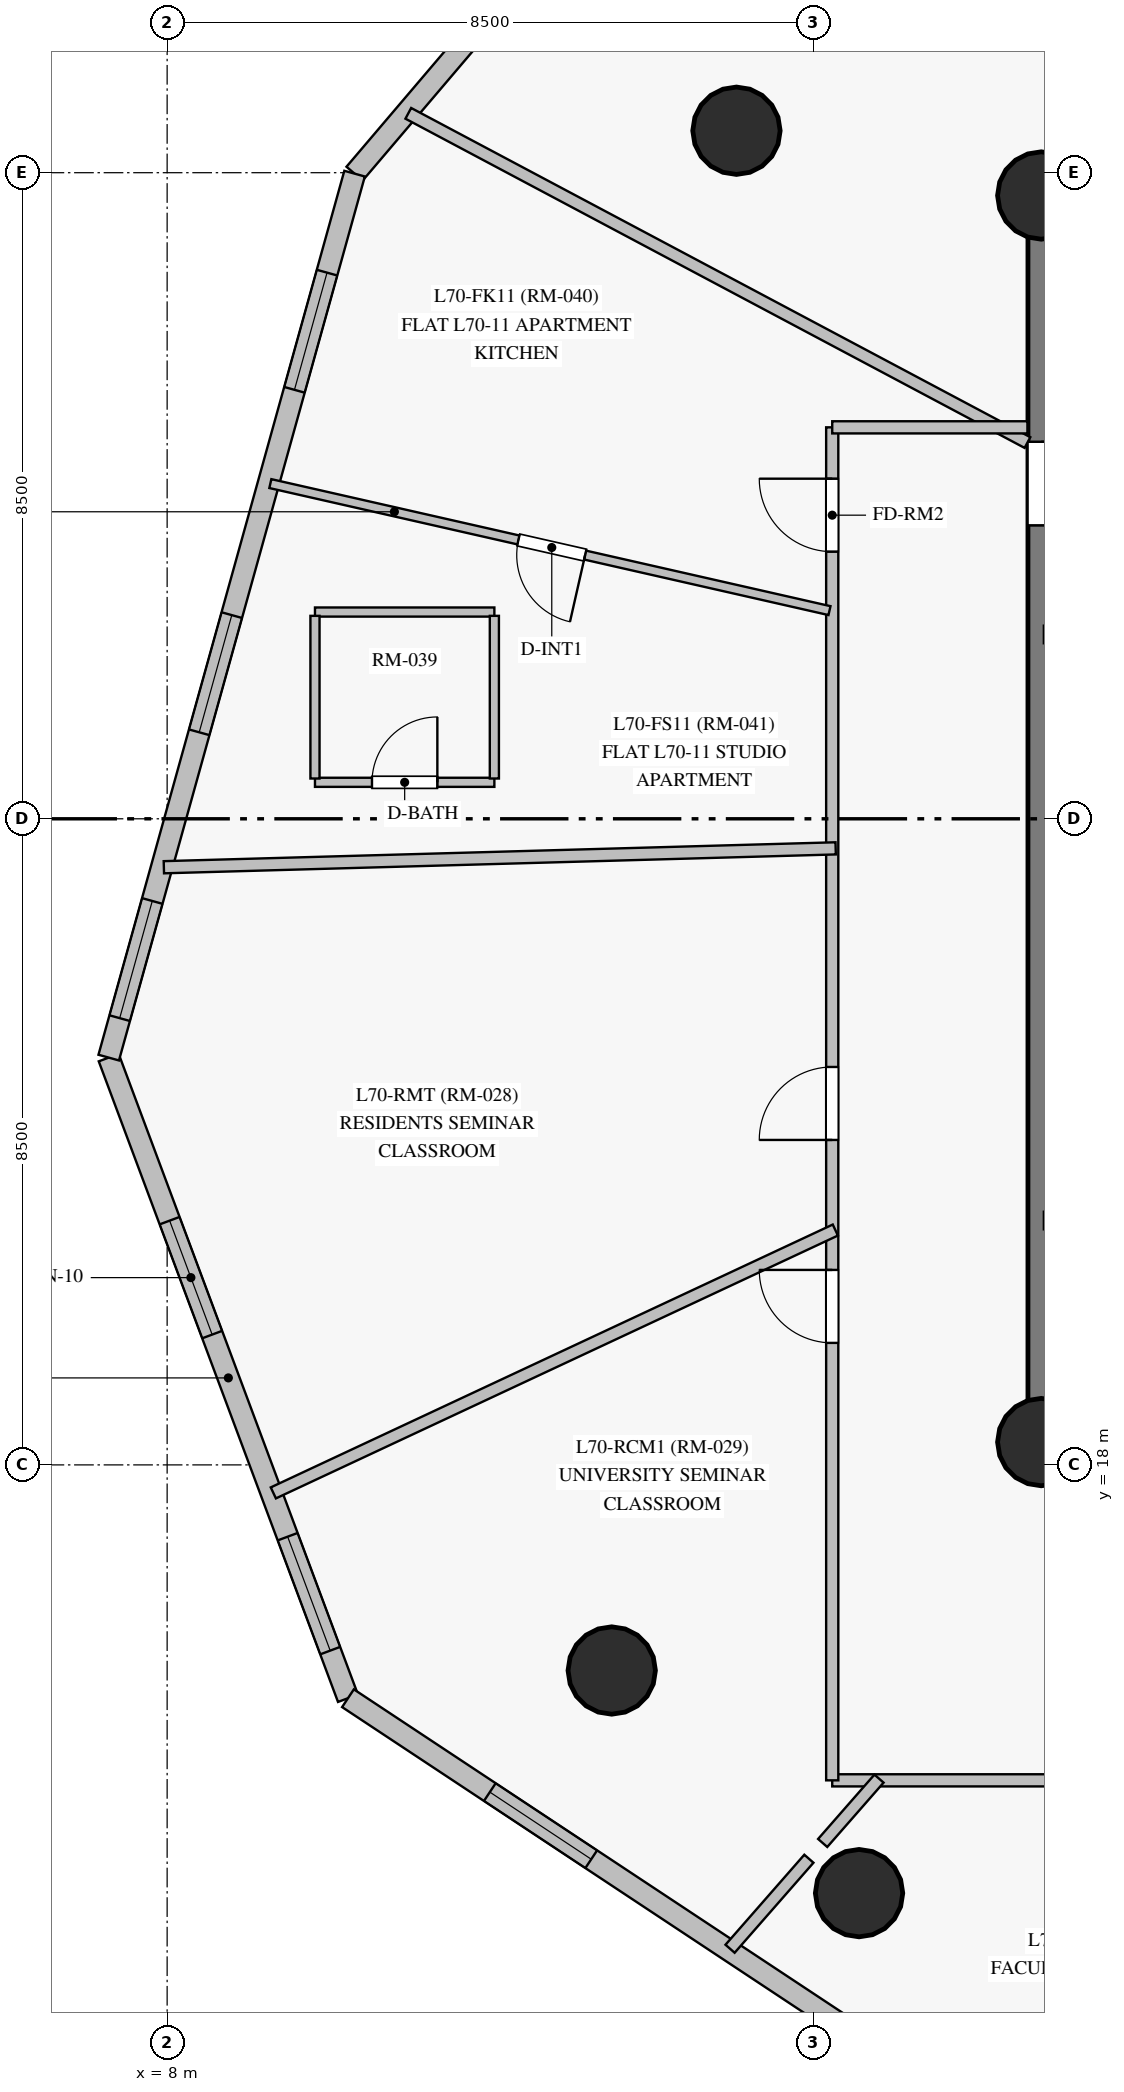
"""IFC4 building model, lengths in metres.
Left out: names, types, materials, properties, quantities, classifications, styles, units other than length and angle.
Written with IfcOpenShell. Run it as: python <this file> out.ifc"""

import sys

from ifc_helpers import new_model, si_unit, direction, frame, frame_2d, origin, origin_with_axes, origin_2d, place, context, subcontext, project, spatial, rectangle, circle, extrude, source, transform, mapped, element, fill, save


model = new_model("IFC4")
c1 = context("Model", 3, precision=1e-05, world=origin(), true_north=direction((0.0, 1.0)))
c2 = subcontext(c1, "Body", "Model", "MODEL_VIEW")
j1 = project(units=[si_unit("LENGTHUNIT", "METRE"), si_unit("PLANEANGLEUNIT", "RADIAN")], contexts=[c1])
p1 = place(None, origin())
s1 = spatial("IfcSite", under=j1, at=p1, CompositionType="ELEMENT")
p2 = place(p1, origin())
s2 = spatial("IfcBuilding", under=s1, at=p2, CompositionType="ELEMENT")
p3 = place(p2, frame((0.0, 0.0, 238.25)))
s3 = spatial("IfcBuildingStorey", under=s2, at=p3, CompositionType="ELEMENT", Elevation=238.25)
p4 = place(p3, frame((19.5, 18.3, 0.0), z_axis=(0.0, 0.0, 1.0), x_axis=(1.0, 0.0, 0.0)))
e1 = element("IfcWall", 1, at=p4, inside=s3, PredefinedType="SHEAR", context=c2, shape_type="SweptSolid", body=[
    extrude(rectangle(XDim=7.05, YDim=0.35, at=frame_2d((3.525, 0.0))), origin(), (0.0, 0.0, 1.0), 2.85),
])
p5 = place(p4, frame((4.2, 0.0, 0.0)))
e2 = element("IfcOpeningElement", 2, at=p5, cuts=e1, PredefinedType="OPENING", context=c2, shape_type="SweptSolid", body=[
    extrude(rectangle(XDim=1.4, YDim=2.2, at=frame_2d((0.7, 1.1))), frame((0.0, 0.185, 0.0), z_axis=(0.0, -1.0, 0.0), x_axis=(1.0, 0.0, 0.0)), (0.0, 0.0, 1.0), 0.37),
])
p6 = place(p3, frame((26.55, 34.7, 0.0), z_axis=(0.0, 0.0, 1.0), x_axis=(-1.0, 0.0, 0.0)))
e3 = element("IfcWall", 3, at=p6, inside=s3, PredefinedType="SHEAR", context=c2, shape_type="SweptSolid", body=[
    extrude(rectangle(XDim=7.05, YDim=0.35, at=frame_2d((3.525, 0.0))), origin(), (0.0, 0.0, 1.0), 2.85),
])
p7 = place(p3, frame((19.5, 34.7, 0.0), z_axis=(0.0, 0.0, 1.0), x_axis=(0.0, -1.0, 0.0)))
e4 = element("IfcWall", 4, at=p7, inside=s3, PredefinedType="SHEAR", context=c2, shape_type="SweptSolid", body=[
    extrude(rectangle(XDim=16.4, YDim=0.35, at=frame_2d((8.2, 0.0))), origin(), (0.0, 0.0, 1.0), 2.85),
])
p8 = place(p7, frame((3.24, 0.0, 0.0)))
e5 = element("IfcOpeningElement", 5, at=p8, cuts=e4, PredefinedType="OPENING", context=c2, shape_type="SweptSolid", body=[
    extrude(rectangle(XDim=1.1, YDim=2.15, at=frame_2d((0.55, 1.075))), frame((0.0, 0.185, 0.0), z_axis=(0.0, -1.0, 0.0), x_axis=(1.0, 0.0, 0.0)), (0.0, 0.0, 1.0), 0.37),
])
m1 = source(origin_with_axes(), c2, "Body", "SweptSolid", [
    extrude(circle(Radius=0.575, at=origin_2d()), origin(), (0.0, 0.0, 1.0), 3.05),
])
for number, where, z_axis, x_axis in (
    (6, (19.5, 18.3, 0.0), (0.0, 0.0, 1.0), (1.0, 0.0, 0.0)),
    (7, (19.5, 34.7, 0.0), (0.0, 0.0, 1.0), (1.0, 0.0, 0.0)),
    (8, (15.49, 35.552, 0.0), (0.0, 0.0, 1.0), (1.0, 0.0, 0.0)),
    (9, (13.849, 15.295, 0.0), (0.0, 0.0, 1.0), (1.0, 0.0, 0.0)),
    (10, (17.103, 12.366, 0.0), (0.0, 0.0, 1.0), (1.0, 0.0, 0.0)),
):
    element("IfcColumn", number, at=place(p3, frame(where, z_axis=z_axis, x_axis=x_axis)), inside=s3, PredefinedType="COLUMN", context=c2, shape_type="MappedRepresentation", body=[
        mapped(m1, transform((0.0, 0.0, 0.0), scale=1.0)),
    ])
p9 = place(p3, frame((7.231, 23.358, 0.0), z_axis=(0.0, 0.0, 1.0), x_axis=(0.349885954816, -0.93679230282, 0.0)))
e11 = element("IfcWall", 11, at=p9, inside=s3, PredefinedType="SOLIDWALL", context=c2, shape_type="SweptSolid", body=[
    extrude(rectangle(XDim=8.996, YDim=0.28, at=frame_2d((4.498, 0.0))), origin(), (0.0, 0.0, 1.0), 2.85),
])
p10 = place(p9, frame((2.29, 0.0, 0.85)))
e12 = element("IfcOpeningElement", 12, at=p10, cuts=e11, PredefinedType="OPENING", context=c2, shape_type="SweptSolid", body=[
    extrude(rectangle(XDim=1.6, YDim=1.6, at=frame_2d((0.8, 0.8))), frame((0.0, 0.15, 0.0), z_axis=(0.0, -1.0, 0.0), x_axis=(1.0, 0.0, 0.0)), (0.0, 0.0, 1.0), 0.3),
])
p11 = place(p9, frame((6.728, 0.0, 0.85)))
e13 = element("IfcOpeningElement", 13, at=p11, cuts=e11, PredefinedType="OPENING", context=c2, shape_type="SweptSolid", body=[
    extrude(rectangle(XDim=1.6, YDim=1.6, at=frame_2d((0.8, 0.8))), frame((0.0, 0.15, 0.0), z_axis=(0.0, -1.0, 0.0), x_axis=(1.0, 0.0, 0.0)), (0.0, 0.0, 1.0), 0.3),
])
p12 = place(p3, frame((10.379, 14.93, 0.0), z_axis=(0.0, 0.0, 1.0), x_axis=(0.83391564232, -0.551891929179, 0.0)))
e14 = element("IfcWall", 14, at=p12, inside=s3, PredefinedType="SOLIDWALL", context=c2, shape_type="SweptSolid", body=[
    extrude(rectangle(XDim=12.071, YDim=0.28, at=frame_2d((6.036, 0.0))), origin(), (0.0, 0.0, 1.0), 2.85),
])
p13 = place(p12, frame((2.238, 0.0, 0.85)))
e15 = element("IfcOpeningElement", 15, at=p13, cuts=e14, PredefinedType="OPENING", context=c2, shape_type="SweptSolid", body=[
    extrude(rectangle(XDim=1.6, YDim=1.6, at=frame_2d((0.8, 0.8))), frame((0.0, 0.15, 0.0), z_axis=(0.0, -1.0, 0.0), x_axis=(1.0, 0.0, 0.0)), (0.0, 0.0, 1.0), 0.3),
])
p14 = place(p12, frame((8.213, 0.0, 0.85)))
e16 = element("IfcOpeningElement", 16, at=p14, cuts=e14, PredefinedType="OPENING", context=c2, shape_type="SweptSolid", body=[
    extrude(rectangle(XDim=1.6, YDim=1.6, at=frame_2d((0.8, 0.8))), frame((0.0, 0.15, 0.0), z_axis=(0.0, -1.0, 0.0), x_axis=(1.0, 0.0, 0.0)), (0.0, 0.0, 1.0), 0.3),
])
p15 = place(p3, frame((16.468, 42.041, 0.0), z_axis=(0.0, 0.0, 1.0), x_axis=(-0.648012583003, -0.761629629327, 0.0)))
e17 = element("IfcWall", 17, at=p15, inside=s3, PredefinedType="SOLIDWALL", context=c2, shape_type="SweptSolid", body=[
    extrude(rectangle(XDim=9.261, YDim=0.28, at=frame_2d((4.631, 0.0))), origin(), (0.0, 0.0, 1.0), 2.85),
])
p16 = place(p15, frame((1.453, 0.0, 0.85)))
e18 = element("IfcOpeningElement", 18, at=p16, cuts=e17, PredefinedType="OPENING", context=c2, shape_type="SweptSolid", body=[
    extrude(rectangle(XDim=1.6, YDim=1.6, at=frame_2d((0.8, 0.8))), frame((0.0, 0.15, 0.0), z_axis=(0.0, -1.0, 0.0), x_axis=(1.0, 0.0, 0.0)), (0.0, 0.0, 1.0), 0.3),
])
p17 = place(p15, frame((5.198, 0.0, 0.85)))
e19 = element("IfcOpeningElement", 19, at=p17, cuts=e17, PredefinedType="OPENING", context=c2, shape_type="SweptSolid", body=[
    extrude(rectangle(XDim=1.6, YDim=1.6, at=frame_2d((0.8, 0.8))), frame((0.0, 0.15, 0.0), z_axis=(0.0, -1.0, 0.0), x_axis=(1.0, 0.0, 0.0)), (0.0, 0.0, 1.0), 0.3),
])
p18 = place(p3, frame((10.466, 34.988, 0.0), z_axis=(0.0, 0.0, 1.0), x_axis=(-0.267969313024, -0.963427447853, 0.0)))
e20 = element("IfcWall", 20, at=p18, inside=s3, PredefinedType="SOLIDWALL", context=c2, shape_type="SweptSolid", body=[
    extrude(rectangle(XDim=12.071, YDim=0.28, at=frame_2d((6.035, 0.0))), origin(), (0.0, 0.0, 1.0), 2.85),
])
p19 = place(p18, frame((1.352, 0.0, 0.85)))
e21 = element("IfcOpeningElement", 21, at=p19, cuts=e20, PredefinedType="OPENING", context=c2, shape_type="SweptSolid", body=[
    extrude(rectangle(XDim=1.6, YDim=1.6, at=frame_2d((0.8, 0.8))), frame((0.0, 0.15, 0.0), z_axis=(0.0, -1.0, 0.0), x_axis=(1.0, 0.0, 0.0)), (0.0, 0.0, 1.0), 0.3),
])
p20 = place(p18, frame((6.029, 0.0, 0.85)))
e22 = element("IfcOpeningElement", 22, at=p20, cuts=e20, PredefinedType="OPENING", context=c2, shape_type="SweptSolid", body=[
    extrude(rectangle(XDim=1.6, YDim=1.6, at=frame_2d((0.8, 0.8))), frame((0.0, 0.15, 0.0), z_axis=(0.0, -1.0, 0.0), x_axis=(1.0, 0.0, 0.0)), (0.0, 0.0, 1.0), 0.3),
])
p21 = place(p18, frame((9.932, 0.0, 0.85)))
e23 = element("IfcOpeningElement", 23, at=p21, cuts=e20, PredefinedType="OPENING", context=c2, shape_type="SweptSolid", body=[
    extrude(rectangle(XDim=1.6, YDim=1.6, at=frame_2d((0.8, 0.8))), frame((0.0, 0.15, 0.0), z_axis=(0.0, -1.0, 0.0), x_axis=(1.0, 0.0, 0.0)), (0.0, 0.0, 1.0), 0.3),
])
p22 = place(p3, frame((41.8, 13.85, 0.0), z_axis=(0.0, 0.0, 1.0), x_axis=(-1.0, 0.0, 0.0)))
e24 = element("IfcWall", 24, at=p22, inside=s3, PredefinedType="PARTITIONING", context=c2, shape_type="SweptSolid", body=[
    extrude(rectangle(XDim=25.05, YDim=0.16, at=frame_2d((12.525, 0.0))), origin(), (0.0, 0.0, 1.0), 2.3),
])
p23 = place(p22, frame((18.312, 0.0, 0.0)))
e25 = element("IfcOpeningElement", 25, at=p23, cuts=e24, PredefinedType="OPENING", context=c2, shape_type="SweptSolid", body=[
    extrude(rectangle(XDim=0.96, YDim=2.15, at=frame_2d((0.48, 1.075))), frame((0.0, 0.09, 0.0), z_axis=(0.0, -1.0, 0.0), x_axis=(1.0, 0.0, 0.0)), (0.0, 0.0, 1.0), 0.18),
])
p24 = place(p22, frame((12.05, 0.0, 0.0)))
e26 = element("IfcOpeningElement", 26, at=p24, cuts=e24, PredefinedType="OPENING", context=c2, shape_type="SweptSolid", body=[
    extrude(rectangle(XDim=0.96, YDim=2.15, at=frame_2d((0.48, 1.075))), frame((0.0, 0.09, 0.0), z_axis=(0.0, -1.0, 0.0), x_axis=(1.0, 0.0, 0.0)), (0.0, 0.0, 1.0), 0.18),
])
p25 = place(p22, frame((8.292, 0.0, 0.0)))
e27 = element("IfcOpeningElement", 27, at=p25, cuts=e24, PredefinedType="OPENING", context=c2, shape_type="SweptSolid", body=[
    extrude(rectangle(XDim=0.96, YDim=2.15, at=frame_2d((0.48, 1.075))), frame((0.0, 0.09, 0.0), z_axis=(0.0, -1.0, 0.0), x_axis=(1.0, 0.0, 0.0)), (0.0, 0.0, 1.0), 0.18),
])
p26 = place(p3, frame((16.75, 13.85, 0.0), z_axis=(0.0, 0.0, 1.0), x_axis=(0.0, 1.0, 0.0)))
e28 = element("IfcWall", 28, at=p26, inside=s3, PredefinedType="PARTITIONING", context=c2, shape_type="SweptSolid", body=[
    extrude(rectangle(XDim=17.8, YDim=0.16, at=frame_2d((8.9, 0.0))), origin(), (0.0, 0.0, 1.0), 2.45),
])
p27 = place(p26, frame((16.164, 0.0, 0.0)))
e29 = element("IfcOpeningElement", 29, at=p27, cuts=e28, PredefinedType="OPENING", context=c2, shape_type="SweptSolid", body=[
    extrude(rectangle(XDim=0.96, YDim=2.15, at=frame_2d((0.48, 1.075))), frame((0.0, 0.09, 0.0), z_axis=(0.0, -1.0, 0.0), x_axis=(1.0, 0.0, 0.0)), (0.0, 0.0, 1.0), 0.18),
])
p28 = place(p26, frame((8.425, 0.0, 0.0)))
e30 = element("IfcOpeningElement", 30, at=p28, cuts=e28, PredefinedType="OPENING", context=c2, shape_type="SweptSolid", body=[
    extrude(rectangle(XDim=0.96, YDim=2.15, at=frame_2d((0.48, 1.075))), frame((0.0, 0.09, 0.0), z_axis=(0.0, -1.0, 0.0), x_axis=(1.0, 0.0, 0.0)), (0.0, 0.0, 1.0), 0.18),
])
p29 = place(p26, frame((5.755, 0.0, 0.0)))
e31 = element("IfcOpeningElement", 31, at=p29, cuts=e28, PredefinedType="OPENING", context=c2, shape_type="SweptSolid", body=[
    extrude(rectangle(XDim=0.96, YDim=2.15, at=frame_2d((0.48, 1.075))), frame((0.0, 0.09, 0.0), z_axis=(0.0, -1.0, 0.0), x_axis=(1.0, 0.0, 0.0)), (0.0, 0.0, 1.0), 0.18),
])
p30 = place(p3, frame((19.319, 31.45, 0.0), z_axis=(0.0, 0.0, 1.0), x_axis=(-0.882947778203, 0.469471214203, 0.0)))
e32 = element("IfcWall", 32, at=p30, inside=s3, PredefinedType="PARTITIONING", context=c2, shape_type="SweptSolid", body=[
    extrude(rectangle(XDim=9.226, YDim=0.16, at=frame_2d((4.613, 0.0))), origin(), (0.0, 0.0, 1.0), 2.85),
])
p31 = place(p3, frame((7.957, 25.863, 0.0), z_axis=(0.0, 0.0, 1.0), x_axis=(0.999605642757, 0.028081292157, 0.0)))
e33 = element("IfcWall", 33, at=p31, inside=s3, PredefinedType="PARTITIONING", context=c2, shape_type="SweptSolid", body=[
    extrude(rectangle(XDim=8.842, YDim=0.16, at=frame_2d((4.421, 0.0))), origin(), (0.0, 0.0, 1.0), 2.85),
])
p32 = place(p3, frame((16.791, 21.09, 0.0), z_axis=(0.0, 0.0, 1.0), x_axis=(-0.905822132806, -0.423658192084, 0.0)))
e34 = element("IfcWall", 34, at=p32, inside=s3, PredefinedType="PARTITIONING", context=c2, shape_type="SweptSolid", body=[
    extrude(rectangle(XDim=8.162, YDim=0.16, at=frame_2d((4.081, 0.0))), origin(), (0.0, 0.0, 1.0), 2.85),
])
p33 = place(p3, frame((16.714, 29.239, 0.0), z_axis=(0.0, 0.0, 1.0), x_axis=(-0.975158919123, 0.22150639371, 0.0)))
e35 = element("IfcWall", 35, at=p33, inside=s3, PredefinedType="PARTITIONING", context=c2, shape_type="SweptSolid", body=[
    extrude(rectangle(XDim=7.543, YDim=0.12, at=frame_2d((3.772, 0.0))), origin(), (0.0, 0.0, 1.0), 2.85),
])
p34 = place(p33, frame((3.297, 0.0, 0.0)))
e36 = element("IfcOpeningElement", 36, at=p34, cuts=e35, PredefinedType="OPENING", context=c2, shape_type="SweptSolid", body=[
    extrude(rectangle(XDim=0.9, YDim=2.1, at=frame_2d((0.45, 1.05))), frame((0.0, 0.07, 0.0), z_axis=(0.0, -1.0, 0.0), x_axis=(1.0, 0.0, 0.0)), (0.0, 0.0, 1.0), 0.14),
])
p35 = place(p3, frame((16.75, 31.65, 0.0), z_axis=(0.0, 0.0, 1.0), x_axis=(1.0, 0.0, 0.0)))
e37 = element("IfcWall", 37, at=p35, inside=s3, PredefinedType="PARTITIONING", context=c2, shape_type="SweptSolid", body=[
    extrude(rectangle(XDim=2.568, YDim=0.16, at=frame_2d((1.284, 0.0))), origin(), (0.0, 0.0, 1.0), 2.85),
])
p36 = place(p3, frame((9.945, 26.98, 0.0), z_axis=(0.0, 0.0, 1.0), x_axis=(1.0, 0.0, 0.0)))
e38 = element("IfcWall", 38, at=p36, inside=s3, PredefinedType="PARTITIONING", context=c2, shape_type="SweptSolid", body=[
    extrude(rectangle(XDim=2.36, YDim=0.12, at=frame_2d((1.18, 0.0))), origin(), (0.0, 0.0, 1.0), 2.85),
])
p37 = place(p36, frame((0.75, 0.0, 0.0)))
e39 = element("IfcOpeningElement", 39, at=p37, cuts=e38, PredefinedType="OPENING", context=c2, shape_type="SweptSolid", body=[
    extrude(rectangle(XDim=0.86, YDim=2.1, at=frame_2d((0.43, 1.05))), frame((0.0, 0.07, 0.0), z_axis=(0.0, -1.0, 0.0), x_axis=(1.0, 0.0, 0.0)), (0.0, 0.0, 1.0), 0.14),
])
p38 = place(p3, frame((12.305, 29.22, 0.0), z_axis=(0.0, 0.0, 1.0), x_axis=(-1.0, 0.0, 0.0)))
e40 = element("IfcWall", 40, at=p38, inside=s3, PredefinedType="PARTITIONING", context=c2, shape_type="SweptSolid", body=[
    extrude(rectangle(XDim=2.36, YDim=0.12, at=frame_2d((1.18, 0.0))), origin(), (0.0, 0.0, 1.0), 2.85),
])
for number, where, z_axis, x_axis in (
    (41, (12.305, 27.03, 0.0), (0.0, 0.0, 1.0), (0.0, 1.0, 0.0)),
    (42, (9.945, 29.17, 0.0), (0.0, 0.0, 1.0), (0.0, -1.0, 0.0)),
):
    element("IfcWall", number, at=place(p3, frame(where, z_axis=z_axis, x_axis=x_axis)), inside=s3, PredefinedType="PARTITIONING", context=c2, shape_type="SweptSolid", body=[
        extrude(rectangle(XDim=2.14, YDim=0.12, at=frame_2d((1.07, 0.0))), origin(), (0.0, 0.0, 1.0), 2.85),
    ])
p39 = place(p3, frame((16.443, 12.819, 0.0), z_axis=(0.0, 0.0, 1.0), x_axis=(-0.65872414358, -0.752384544409, 0.0)))
e43 = element("IfcWall", 43, at=p39, inside=s3, PredefinedType="PARTITIONING", context=c2, shape_type="SweptSolid", body=[
    extrude(rectangle(XDim=1.574, YDim=0.16, at=frame_2d((0.787, 0.0))), origin(), (0.0, 0.0, 1.0), 2.85),
])
p40 = place(p3, frame((17.365, 13.873, 0.0), z_axis=(0.0, 0.0, 1.0), x_axis=(-0.658688907656, -0.75241539254, 0.0)))
e44 = element("IfcWall", 44, at=p40, inside=s3, PredefinedType="PARTITIONING", context=c2, shape_type="SweptSolid", body=[
    extrude(rectangle(XDim=1.125, YDim=0.16, at=frame_2d((0.562, 0.0))), origin(), (0.0, 0.0, 1.0), 2.35),
])
m2 = source(origin_with_axes(), c2, "Body", "SweptSolid", [
    extrude(rectangle(XDim=1.6, YDim=1.6, at=frame_2d((0.8, 0.8))), frame((0.0, 0.03, 0.0), z_axis=(0.0, -1.0, 0.0), x_axis=(1.0, 0.0, 0.0)), (0.0, 0.0, 1.0), 0.06),
])
p41 = place(p10, origin())
e45 = element("IfcWindow", 45, at=p41, inside=s3, PartitioningType="SINGLE_PANEL", PredefinedType="WINDOW", context=c2, shape_type="MappedRepresentation", body=[
    mapped(m2, transform((0.0, 0.0, 0.0), scale=1.0)),
])
fill(e12, e45)
p42 = place(p11, origin())
e46 = element("IfcWindow", 46, at=p42, inside=s3, PartitioningType="SINGLE_PANEL", PredefinedType="WINDOW", context=c2, shape_type="MappedRepresentation", body=[
    mapped(m2, transform((0.0, 0.0, 0.0), scale=1.0)),
])
fill(e13, e46)
p43 = place(p13, origin())
e47 = element("IfcWindow", 47, at=p43, inside=s3, PartitioningType="SINGLE_PANEL", PredefinedType="WINDOW", context=c2, shape_type="MappedRepresentation", body=[
    mapped(m2, transform((0.0, 0.0, 0.0), scale=1.0)),
])
fill(e15, e47)
p44 = place(p19, origin())
e48 = element("IfcWindow", 48, at=p44, inside=s3, PartitioningType="SINGLE_PANEL", PredefinedType="WINDOW", context=c2, shape_type="MappedRepresentation", body=[
    mapped(m2, transform((0.0, 0.0, 0.0), scale=1.0)),
])
fill(e21, e48)
p45 = place(p20, origin())
e49 = element("IfcWindow", 49, at=p45, inside=s3, PartitioningType="SINGLE_PANEL", PredefinedType="WINDOW", context=c2, shape_type="MappedRepresentation", body=[
    mapped(m2, transform((0.0, 0.0, 0.0), scale=1.0)),
])
fill(e22, e49)
p46 = place(p21, origin())
e50 = element("IfcWindow", 50, at=p46, inside=s3, PartitioningType="SINGLE_PANEL", PredefinedType="WINDOW", context=c2, shape_type="MappedRepresentation", body=[
    mapped(m2, transform((0.0, 0.0, 0.0), scale=1.0)),
])
fill(e23, e50)
m3 = source(origin_with_axes(), c2, "Body", "SweptSolid", [
    extrude(rectangle(XDim=1.1, YDim=2.15, at=frame_2d((0.55, 1.075))), frame((0.0, 0.025, 0.0), z_axis=(0.0, -1.0, 0.0), x_axis=(1.0, 0.0, 0.0)), (0.0, 0.0, 1.0), 0.05),
])
p47 = place(p8, origin())
e51 = element("IfcDoor", 51, at=p47, inside=s3, OperationType="SINGLE_SWING_LEFT", PredefinedType="DOOR", context=c2, shape_type="MappedRepresentation", body=[
    mapped(m3, transform((0.0, 0.0, 0.0), scale=1.0)),
])
fill(e5, e51)
m4 = source(origin_with_axes(), c2, "Body", "SweptSolid", [
    extrude(rectangle(XDim=0.86, YDim=2.1, at=frame_2d((0.43, 1.05))), frame((0.0, 0.025, 0.0), z_axis=(0.0, -1.0, 0.0), x_axis=(1.0, 0.0, 0.0)), (0.0, 0.0, 1.0), 0.05),
])
p48 = place(p37, origin())
e52 = element("IfcDoor", 52, at=p48, inside=s3, OperationType="SINGLE_SWING_RIGHT", PredefinedType="DOOR", context=c2, shape_type="MappedRepresentation", body=[
    mapped(m4, transform((0.0, 0.0, 0.0), scale=1.0)),
])
fill(e39, e52)
m5 = source(origin_with_axes(), c2, "Body", "SweptSolid", [
    extrude(rectangle(XDim=0.9, YDim=2.1, at=frame_2d((0.45, 1.05))), frame((0.0, 0.025, 0.0), z_axis=(0.0, -1.0, 0.0), x_axis=(1.0, 0.0, 0.0)), (0.0, 0.0, 1.0), 0.05),
])
p49 = place(p34, origin())
e53 = element("IfcDoor", 53, at=p49, inside=s3, OperationType="SINGLE_SWING_LEFT", PredefinedType="DOOR", context=c2, shape_type="MappedRepresentation", body=[
    mapped(m5, transform((0.0, 0.0, 0.0), scale=1.0)),
])
fill(e36, e53)
m6 = source(origin_with_axes(), c2, "Body", "SweptSolid", [
    extrude(rectangle(XDim=0.96, YDim=2.15, at=frame_2d((0.48, 1.075))), frame((0.0, 0.025, 0.0), z_axis=(0.0, -1.0, 0.0), x_axis=(1.0, 0.0, 0.0)), (0.0, 0.0, 1.0), 0.05),
])
p50 = place(p27, origin())
e54 = element("IfcDoor", 54, at=p50, inside=s3, OperationType="SINGLE_SWING_RIGHT", PredefinedType="DOOR", context=c2, shape_type="MappedRepresentation", body=[
    mapped(m6, transform((0.0, 0.0, 0.0), scale=1.0)),
])
fill(e29, e54)
p51 = place(p28, origin())
e55 = element("IfcDoor", 55, at=p51, inside=s3, OperationType="SINGLE_SWING_LEFT", PredefinedType="DOOR", context=c2, shape_type="MappedRepresentation", body=[
    mapped(m6, transform((0.0, 0.0, 0.0), scale=1.0)),
])
fill(e30, e55)
p52 = place(p29, origin())
e56 = element("IfcDoor", 56, at=p52, inside=s3, OperationType="SINGLE_SWING_RIGHT", PredefinedType="DOOR", context=c2, shape_type="MappedRepresentation", body=[
    mapped(m6, transform((0.0, 0.0, 0.0), scale=1.0)),
])
fill(e31, e56)
save(model, sys.argv[1])
